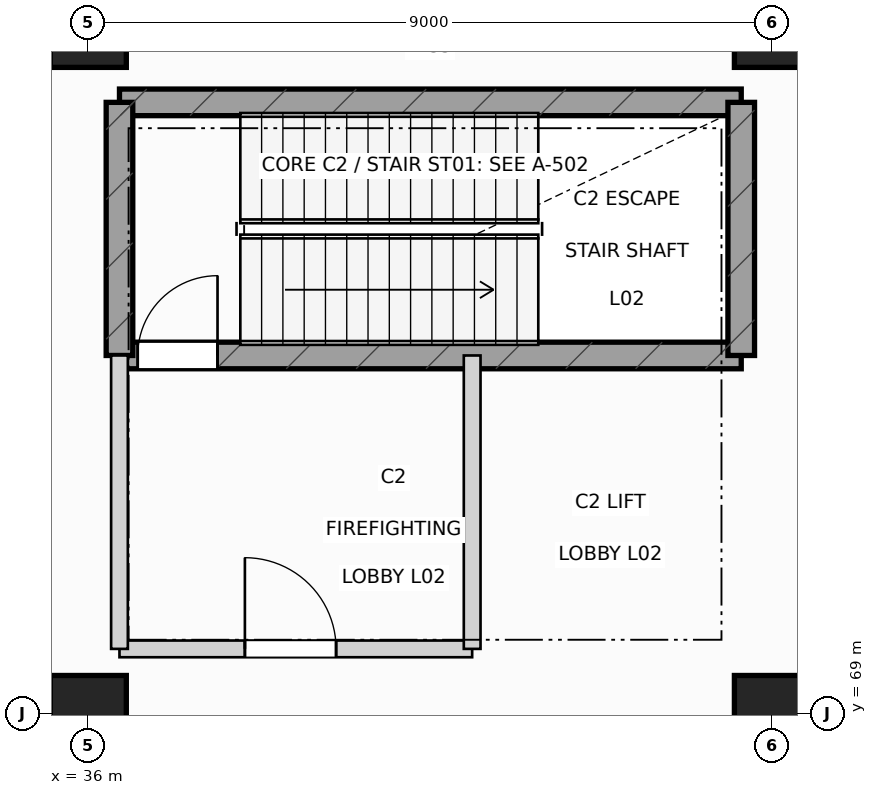
"""IFC4 building model, lengths in metres.
Left out: names, types, materials, properties, quantities, classifications, styles, units other than length and angle.
Written with IfcOpenShell. Run it as: python <this file> out.ifc"""

import sys

from ifc_helpers import new_model, si_unit, direction, frame, frame_2d, origin, origin_2d, place, context, subcontext, project, spatial, rectangle, extrude, element, fill, save


model = new_model("IFC4")
c1 = context("Model", 3, precision=1e-05, world=origin(), true_north=direction((0.0, 1.0)))
c2 = subcontext(c1, "Body", "Model", "MODEL_VIEW")
j1 = project(units=[si_unit("LENGTHUNIT", "METRE"), si_unit("PLANEANGLEUNIT", "RADIAN")], contexts=[c1])
p1 = place(None, origin())
s1 = spatial("IfcSite", under=j1, at=p1, CompositionType="ELEMENT")
p2 = place(p1, origin())
s2 = spatial("IfcBuilding", under=s1, at=p2, CompositionType="ELEMENT")
p3 = place(p2, frame((0.0, 0.0, 11.4)))
s3 = spatial("IfcBuildingStorey", under=s2, at=p3, CompositionType="ELEMENT", Elevation=11.4)
for number, where, z_axis, x_axis in (
    (1, (36.0, 69.0, 0.0), (0.0, 0.0, 1.0), (1.0, 0.0, 0.0)),
    (2, (36.0, 78.0, 0.0), (0.0, 0.0, 1.0), (1.0, 0.0, 0.0)),
    (3, (45.0, 69.0, 0.0), (0.0, 0.0, 1.0), (1.0, 0.0, 0.0)),
    (4, (45.0, 78.0, 0.0), (0.0, 0.0, 1.0), (1.0, 0.0, 0.0)),
):
    element("IfcColumn", number, at=place(p3, frame(where, z_axis=z_axis, x_axis=x_axis)), inside=s3, PredefinedType="COLUMN", context=c2, shape_type="SweptSolid", body=[
        extrude(rectangle(XDim=1.0, YDim=1.0, at=origin_2d()), origin(), (0.0, 0.0, 1.0), 5.4),
    ])
p4 = place(p3, frame((36.41, 73.71, 0.0), z_axis=(0.0, 0.0, 1.0), x_axis=(1.0, 0.0, 0.0)))
e5 = element("IfcWall", 5, at=p4, inside=s3, PredefinedType="SHEAR", context=c2, shape_type="SweptSolid", body=[
    extrude(rectangle(XDim=8.18, YDim=0.35, at=frame_2d((4.09, 0.0))), origin(), (0.0, 0.0, 1.0), 5.12),
])
p5 = place(p4, frame((0.24, 0.0, 0.0)))
e6 = element("IfcOpeningElement", 6, at=p5, cuts=e5, PredefinedType="OPENING", context=c2, shape_type="SweptSolid", body=[
    extrude(rectangle(XDim=1.05, YDim=2.18, at=frame_2d((0.525, 1.09))), frame((0.0, 0.185, 0.0), z_axis=(0.0, -1.0, 0.0), x_axis=(1.0, 0.0, 0.0)), (0.0, 0.0, 1.0), 0.37),
])
p6 = place(p3, frame((36.41, 77.04, 0.0), z_axis=(0.0, 0.0, 1.0), x_axis=(1.0, 0.0, 0.0)))
e7 = element("IfcWall", 7, at=p6, inside=s3, PredefinedType="SHEAR", context=c2, shape_type="SweptSolid", body=[
    extrude(rectangle(XDim=8.18, YDim=0.35, at=frame_2d((4.09, 0.0))), origin(), (0.0, 0.0, 1.0), 5.12),
])
for number, where, z_axis, x_axis in (
    (8, (36.41, 73.71, 0.0), (0.0, 0.0, 1.0), (0.0, 1.0, 0.0)),
    (9, (44.59, 73.71, 0.0), (0.0, 0.0, 1.0), (0.0, 1.0, 0.0)),
):
    element("IfcWall", number, at=place(p3, frame(where, z_axis=z_axis, x_axis=x_axis)), inside=s3, PredefinedType="SHEAR", context=c2, shape_type="SweptSolid", body=[
        extrude(rectangle(XDim=3.33, YDim=0.35, at=frame_2d((1.665, 0.0))), origin(), (0.0, 0.0, 1.0), 5.12),
    ])
p7 = place(p3, frame((36.41, 69.85, 0.0), z_axis=(0.0, 0.0, 1.0), x_axis=(1.0, 0.0, 0.0)))
e10 = element("IfcWall", 10, at=p7, inside=s3, PredefinedType="PARTITIONING", context=c2, shape_type="SweptSolid", body=[
    extrude(rectangle(XDim=4.64, YDim=0.22, at=frame_2d((2.32, 0.0))), origin(), (0.0, 0.0, 1.0), 4.485),
])
p8 = place(p7, frame((1.65, 0.0, 0.0)))
e11 = element("IfcOpeningElement", 11, at=p8, cuts=e10, PredefinedType="OPENING", context=c2, shape_type="SweptSolid", body=[
    extrude(rectangle(XDim=1.2, YDim=2.18, at=frame_2d((0.6, 1.09))), frame((0.0, 0.12, 0.0), z_axis=(0.0, -1.0, 0.0), x_axis=(1.0, 0.0, 0.0)), (0.0, 0.0, 1.0), 0.24),
])
p9 = place(p3, frame((36.41, 69.85, 0.0), z_axis=(0.0, 0.0, 1.0), x_axis=(0.0, 1.0, 0.0)))
e12 = element("IfcWall", 12, at=p9, inside=s3, PredefinedType="PARTITIONING", context=c2, shape_type="SweptSolid", body=[
    extrude(rectangle(XDim=3.86, YDim=0.22, at=frame_2d((1.93, 0.0))), origin(), (0.0, 0.0, 1.0), 4.485),
])
p10 = place(p3, frame((41.05, 69.85, 0.0), z_axis=(0.0, 0.0, 1.0), x_axis=(0.0, 1.0, 0.0)))
e13 = element("IfcWall", 13, at=p10, inside=s3, PredefinedType="PARTITIONING", context=c2, shape_type="SweptSolid", body=[
    extrude(rectangle(XDim=3.86, YDim=0.22, at=frame_2d((1.93, 0.0))), origin(), (0.0, 0.0, 1.0), 4.845),
])
p11 = place(p5, origin())
e14 = element("IfcDoor", 14, at=p11, inside=s3, OperationType="SINGLE_SWING_RIGHT", PredefinedType="DOOR", context=c2, shape_type="SweptSolid", body=[
    extrude(rectangle(XDim=1.05, YDim=2.18, at=frame_2d((0.525, 1.09))), frame((0.0, 0.025, 0.0), z_axis=(0.0, -1.0, 0.0), x_axis=(1.0, 0.0, 0.0)), (0.0, 0.0, 1.0), 0.05),
])
fill(e6, e14)
p12 = place(p8, origin())
e15 = element("IfcDoor", 15, at=p12, inside=s3, OperationType="SINGLE_SWING_LEFT", PredefinedType="DOOR", context=c2, shape_type="SweptSolid", body=[
    extrude(rectangle(XDim=1.2, YDim=2.18, at=frame_2d((0.6, 1.09))), frame((0.0, 0.025, 0.0), z_axis=(0.0, -1.0, 0.0), x_axis=(1.0, 0.0, 0.0)), (0.0, 0.0, 1.0), 0.05),
])
fill(e11, e15)
save(model, sys.argv[1])
